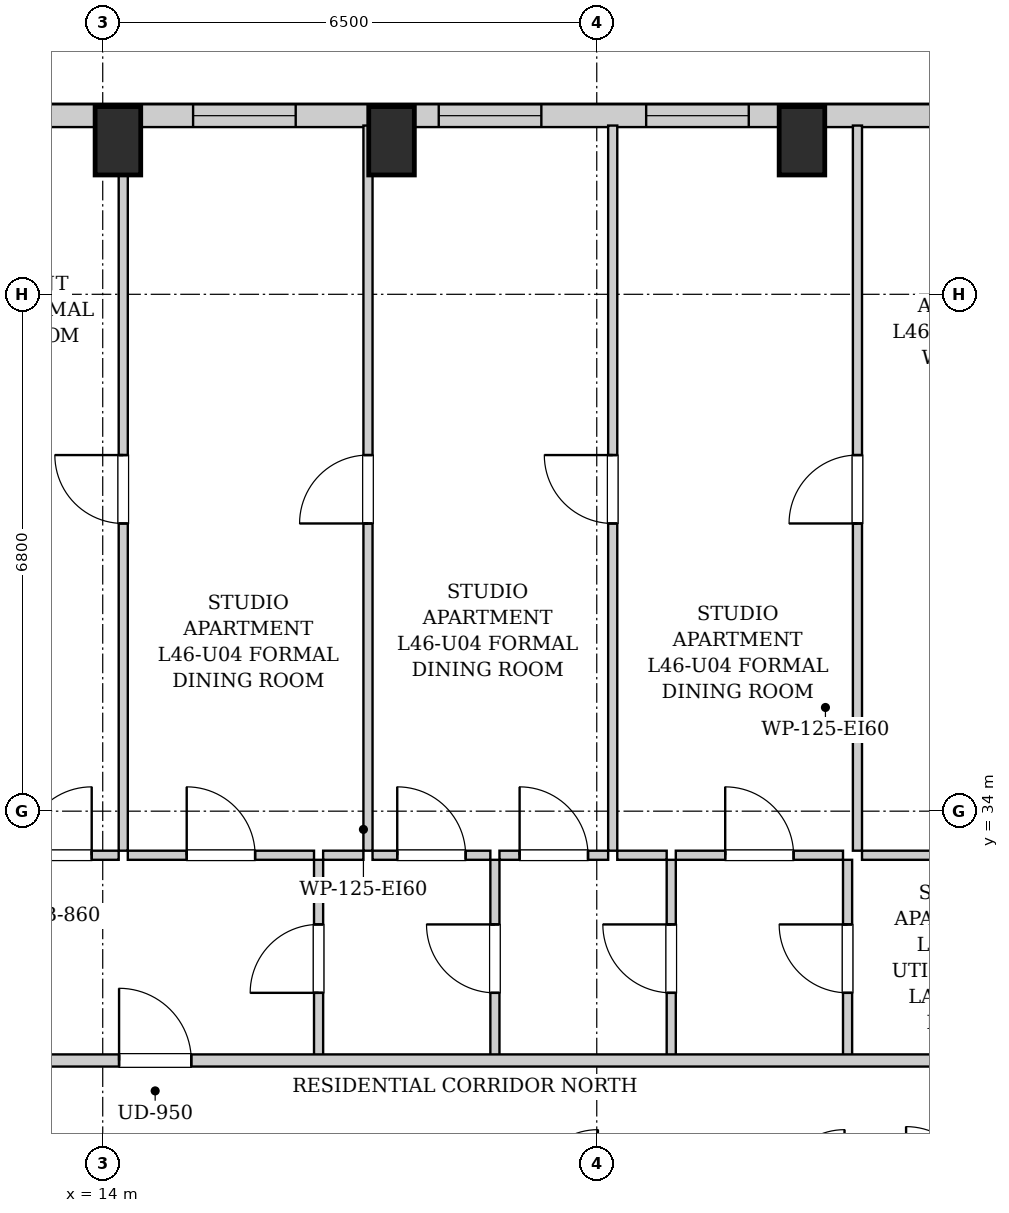
"""IFC4 building model, lengths in metres.
Left out: names, types, materials, properties, quantities, classifications, styles, units other than length and angle.
Written with IfcOpenShell. Run it as: python <this file> out.ifc"""

import sys

from ifc_helpers import new_model, si_unit, direction, frame, frame_2d, origin, origin_2d, place, context, subcontext, project, spatial, rectangle, extrude, element, fill, save


model = new_model("IFC4")
c1 = context("Model", 3, precision=1e-05, world=origin(), true_north=direction((0.0, 1.0)))
c2 = subcontext(c1, "Body", "Model", "MODEL_VIEW")
j1 = project(units=[si_unit("LENGTHUNIT", "METRE"), si_unit("PLANEANGLEUNIT", "RADIAN")], contexts=[c1])
p1 = place(None, origin())
s1 = spatial("IfcSite", under=j1, at=p1, CompositionType="ELEMENT")
p2 = place(p1, origin())
s2 = spatial("IfcBuilding", under=s1, at=p2, CompositionType="ELEMENT")
p3 = place(p2, frame((0.0, 0.0, 160.15)))
s3 = spatial("IfcBuildingStorey", under=s2, at=p3, CompositionType="ELEMENT", Elevation=160.15)
for number, where, z_axis, x_axis in (
    (1, (14.2, 42.82, 0.0), (0.0, 0.0, 1.0), (1.0, 0.0, 0.0)),
    (2, (17.8, 42.82, 0.0), (0.0, 0.0, 1.0), (1.0, 0.0, 0.0)),
    (3, (23.2, 42.82, 0.0), (0.0, 0.0, 1.0), (1.0, 0.0, 0.0)),
):
    element("IfcColumn", number, at=place(p3, frame(where, z_axis=z_axis, x_axis=x_axis)), inside=s3, PredefinedType="COLUMN", context=c2, shape_type="SweptSolid", body=[
        extrude(rectangle(XDim=0.6, YDim=0.9, at=origin_2d()), origin(), (0.0, 0.0, 1.0), 3.25),
    ])
p4 = place(p3, frame((10.0, 43.15, 0.0), z_axis=(0.0, 0.0, 1.0), x_axis=(1.0, 0.0, 0.0)))
e4 = element("IfcWall", 4, at=p4, inside=s3, PredefinedType="SOLIDWALL", context=c2, shape_type="SweptSolid", body=[
    extrude(rectangle(XDim=21.35, YDim=0.3, at=frame_2d((10.675, 0.0))), origin(), (0.0, 0.0, 1.0), 2.99),
])
p5 = place(p4, frame((1.956, 0.0, 0.55)))
e5 = element("IfcOpeningElement", 5, at=p5, cuts=e4, PredefinedType="OPENING", context=c2, shape_type="SweptSolid", body=[
    extrude(rectangle(XDim=1.35, YDim=1.2, at=frame_2d((0.675, 0.6))), frame((0.0, 0.16, 0.0), z_axis=(0.0, -1.0, 0.0), x_axis=(1.0, 0.0, 0.0)), (0.0, 0.0, 1.0), 0.32),
])
p6 = place(p4, frame((5.189, 0.0, 0.55)))
e6 = element("IfcOpeningElement", 6, at=p6, cuts=e4, PredefinedType="OPENING", context=c2, shape_type="SweptSolid", body=[
    extrude(rectangle(XDim=1.35, YDim=1.2, at=frame_2d((0.675, 0.6))), frame((0.0, 0.16, 0.0), z_axis=(0.0, -1.0, 0.0), x_axis=(1.0, 0.0, 0.0)), (0.0, 0.0, 1.0), 0.32),
])
p7 = place(p4, frame((8.421, 0.0, 0.55)))
e7 = element("IfcOpeningElement", 7, at=p7, cuts=e4, PredefinedType="OPENING", context=c2, shape_type="SweptSolid", body=[
    extrude(rectangle(XDim=1.35, YDim=1.2, at=frame_2d((0.675, 0.6))), frame((0.0, 0.16, 0.0), z_axis=(0.0, -1.0, 0.0), x_axis=(1.0, 0.0, 0.0)), (0.0, 0.0, 1.0), 0.32),
])
p8 = place(p4, frame((11.15, 0.0, 0.55)))
e8 = element("IfcOpeningElement", 8, at=p8, cuts=e4, PredefinedType="OPENING", context=c2, shape_type="SweptSolid", body=[
    extrude(rectangle(XDim=1.35, YDim=1.2, at=frame_2d((0.675, 0.6))), frame((0.0, 0.16, 0.0), z_axis=(0.0, -1.0, 0.0), x_axis=(1.0, 0.0, 0.0)), (0.0, 0.0, 1.0), 0.32),
])
p9 = place(p4, frame((18.044, 0.0, 0.55)))
e9 = element("IfcOpeningElement", 9, at=p9, cuts=e4, PredefinedType="OPENING", context=c2, shape_type="SweptSolid", body=[
    extrude(rectangle(XDim=1.35, YDim=1.2, at=frame_2d((0.675, 0.6))), frame((0.0, 0.16, 0.0), z_axis=(0.0, -1.0, 0.0), x_axis=(1.0, 0.0, 0.0)), (0.0, 0.0, 1.0), 0.32),
])
p10 = place(p3, frame((16.84, 30.76, 0.0), z_axis=(0.0, 0.0, 1.0), x_axis=(0.0, 1.0, 0.0)))
e10 = element("IfcWall", 10, at=p10, inside=s3, PredefinedType="PARTITIONING", context=c2, shape_type="SweptSolid", body=[
    extrude(rectangle(XDim=2.6, YDim=0.12, at=frame_2d((1.3, 0.0))), origin(), (0.0, 0.0, 1.0), 2.99),
])
p11 = place(p10, frame((0.85, 0.0, 0.0)))
e11 = element("IfcOpeningElement", 11, at=p11, cuts=e10, PredefinedType="OPENING", context=c2, shape_type="SweptSolid", body=[
    extrude(rectangle(XDim=0.9, YDim=2.05, at=frame_2d((0.45, 1.025))), frame((0.0, 0.07, 0.0), z_axis=(0.0, -1.0, 0.0), x_axis=(1.0, 0.0, 0.0)), (0.0, 0.0, 1.0), 0.14),
])
p12 = place(p3, frame((12.6, 33.42, 0.0), z_axis=(0.0, 0.0, 1.0), x_axis=(1.0, 0.0, 0.0)))
e12 = element("IfcWall", 12, at=p12, inside=s3, PredefinedType="PARTITIONING", context=c2, shape_type="SweptSolid", body=[
    extrude(rectangle(XDim=1.61, YDim=0.12, at=frame_2d((0.805, 0.0))), origin(), (0.0, 0.0, 1.0), 2.99),
])
p13 = place(p12, frame((0.355, 0.0, 0.0)))
e13 = element("IfcOpeningElement", 13, at=p13, cuts=e12, PredefinedType="OPENING", context=c2, shape_type="SweptSolid", body=[
    extrude(rectangle(XDim=0.9, YDim=2.05, at=frame_2d((0.45, 1.025))), frame((0.0, 0.07, 0.0), z_axis=(0.0, -1.0, 0.0), x_axis=(1.0, 0.0, 0.0)), (0.0, 0.0, 1.0), 0.14),
])
p14 = place(p3, frame((14.33, 33.42, 0.0), z_axis=(0.0, 0.0, 1.0), x_axis=(1.0, 0.0, 0.0)))
e14 = element("IfcWall", 14, at=p14, inside=s3, PredefinedType="PARTITIONING", context=c2, shape_type="SweptSolid", body=[
    extrude(rectangle(XDim=2.45, YDim=0.12, at=frame_2d((1.225, 0.0))), origin(), (0.0, 0.0, 1.0), 2.99),
])
p15 = place(p14, frame((0.775, 0.0, 0.0)))
e15 = element("IfcOpeningElement", 15, at=p15, cuts=e14, PredefinedType="OPENING", context=c2, shape_type="SweptSolid", body=[
    extrude(rectangle(XDim=0.9, YDim=2.05, at=frame_2d((0.45, 1.025))), frame((0.0, 0.07, 0.0), z_axis=(0.0, -1.0, 0.0), x_axis=(1.0, 0.0, 0.0)), (0.0, 0.0, 1.0), 0.14),
])
p16 = place(p3, frame((19.16, 30.76, 0.0), z_axis=(0.0, 0.0, 1.0), x_axis=(0.0, 1.0, 0.0)))
e16 = element("IfcWall", 16, at=p16, inside=s3, PredefinedType="PARTITIONING", context=c2, shape_type="SweptSolid", body=[
    extrude(rectangle(XDim=2.6, YDim=0.12, at=frame_2d((1.3, 0.0))), origin(), (0.0, 0.0, 1.0), 2.99),
])
p17 = place(p16, frame((0.85, 0.0, 0.0)))
e17 = element("IfcOpeningElement", 17, at=p17, cuts=e16, PredefinedType="OPENING", context=c2, shape_type="SweptSolid", body=[
    extrude(rectangle(XDim=0.9, YDim=2.05, at=frame_2d((0.45, 1.025))), frame((0.0, 0.07, 0.0), z_axis=(0.0, -1.0, 0.0), x_axis=(1.0, 0.0, 0.0)), (0.0, 0.0, 1.0), 0.14),
])
p18 = place(p3, frame((16.9, 33.42, 0.0), z_axis=(0.0, 0.0, 1.0), x_axis=(1.0, 0.0, 0.0)))
e18 = element("IfcWall", 18, at=p18, inside=s3, PredefinedType="PARTITIONING", context=c2, shape_type="SweptSolid", body=[
    extrude(rectangle(XDim=0.53, YDim=0.12, at=frame_2d((0.265, 0.0))), origin(), (0.0, 0.0, 1.0), 2.99),
])
p19 = place(p3, frame((17.55, 33.42, 0.0), z_axis=(0.0, 0.0, 1.0), x_axis=(1.0, 0.0, 0.0)))
e19 = element("IfcWall", 19, at=p19, inside=s3, PredefinedType="PARTITIONING", context=c2, shape_type="SweptSolid", body=[
    extrude(rectangle(XDim=1.55, YDim=0.12, at=frame_2d((0.775, 0.0))), origin(), (0.0, 0.0, 1.0), 2.99),
])
p20 = place(p19, frame((0.325, 0.0, 0.0)))
e20 = element("IfcOpeningElement", 20, at=p20, cuts=e19, PredefinedType="OPENING", context=c2, shape_type="SweptSolid", body=[
    extrude(rectangle(XDim=0.9, YDim=2.05, at=frame_2d((0.45, 1.025))), frame((0.0, 0.07, 0.0), z_axis=(0.0, -1.0, 0.0), x_axis=(1.0, 0.0, 0.0)), (0.0, 0.0, 1.0), 0.14),
])
p21 = place(p3, frame((21.48, 30.76, 0.0), z_axis=(0.0, 0.0, 1.0), x_axis=(0.0, 1.0, 0.0)))
e21 = element("IfcWall", 21, at=p21, inside=s3, PredefinedType="PARTITIONING", context=c2, shape_type="SweptSolid", body=[
    extrude(rectangle(XDim=2.6, YDim=0.12, at=frame_2d((1.3, 0.0))), origin(), (0.0, 0.0, 1.0), 2.99),
])
p22 = place(p21, frame((0.85, 0.0, 0.0)))
e22 = element("IfcOpeningElement", 22, at=p22, cuts=e21, PredefinedType="OPENING", context=c2, shape_type="SweptSolid", body=[
    extrude(rectangle(XDim=0.9, YDim=2.05, at=frame_2d((0.45, 1.025))), frame((0.0, 0.07, 0.0), z_axis=(0.0, -1.0, 0.0), x_axis=(1.0, 0.0, 0.0)), (0.0, 0.0, 1.0), 0.14),
])
p23 = place(p3, frame((19.22, 33.42, 0.0), z_axis=(0.0, 0.0, 1.0), x_axis=(1.0, 0.0, 0.0)))
e23 = element("IfcWall", 23, at=p23, inside=s3, PredefinedType="PARTITIONING", context=c2, shape_type="SweptSolid", body=[
    extrude(rectangle(XDim=1.43, YDim=0.12, at=frame_2d((0.715, 0.0))), origin(), (0.0, 0.0, 1.0), 2.99),
])
p24 = place(p23, frame((0.265, 0.0, 0.0)))
e24 = element("IfcOpeningElement", 24, at=p24, cuts=e23, PredefinedType="OPENING", context=c2, shape_type="SweptSolid", body=[
    extrude(rectangle(XDim=0.9, YDim=2.05, at=frame_2d((0.45, 1.025))), frame((0.0, 0.07, 0.0), z_axis=(0.0, -1.0, 0.0), x_axis=(1.0, 0.0, 0.0)), (0.0, 0.0, 1.0), 0.14),
])
p25 = place(p3, frame((20.77, 33.42, 0.0), z_axis=(0.0, 0.0, 1.0), x_axis=(1.0, 0.0, 0.0)))
e25 = element("IfcWall", 25, at=p25, inside=s3, PredefinedType="PARTITIONING", context=c2, shape_type="SweptSolid", body=[
    extrude(rectangle(XDim=0.65, YDim=0.12, at=frame_2d((0.325, 0.0))), origin(), (0.0, 0.0, 1.0), 2.99),
])
p26 = place(p3, frame((23.8, 30.76, 0.0), z_axis=(0.0, 0.0, 1.0), x_axis=(0.0, 1.0, 0.0)))
e26 = element("IfcWall", 26, at=p26, inside=s3, PredefinedType="PARTITIONING", context=c2, shape_type="SweptSolid", body=[
    extrude(rectangle(XDim=2.6, YDim=0.12, at=frame_2d((1.3, 0.0))), origin(), (0.0, 0.0, 1.0), 2.99),
])
p27 = place(p26, frame((0.85, 0.0, 0.0)))
e27 = element("IfcOpeningElement", 27, at=p27, cuts=e26, PredefinedType="OPENING", context=c2, shape_type="SweptSolid", body=[
    extrude(rectangle(XDim=0.9, YDim=2.05, at=frame_2d((0.45, 1.025))), frame((0.0, 0.07, 0.0), z_axis=(0.0, -1.0, 0.0), x_axis=(1.0, 0.0, 0.0)), (0.0, 0.0, 1.0), 0.14),
])
p28 = place(p3, frame((21.54, 33.42, 0.0), z_axis=(0.0, 0.0, 1.0), x_axis=(1.0, 0.0, 0.0)))
e28 = element("IfcWall", 28, at=p28, inside=s3, PredefinedType="PARTITIONING", context=c2, shape_type="SweptSolid", body=[
    extrude(rectangle(XDim=2.2, YDim=0.12, at=frame_2d((1.1, 0.0))), origin(), (0.0, 0.0, 1.0), 2.99),
])
p29 = place(p28, frame((0.65, 0.0, 0.0)))
e29 = element("IfcOpeningElement", 29, at=p29, cuts=e28, PredefinedType="OPENING", context=c2, shape_type="SweptSolid", body=[
    extrude(rectangle(XDim=0.9, YDim=2.05, at=frame_2d((0.45, 1.025))), frame((0.0, 0.07, 0.0), z_axis=(0.0, -1.0, 0.0), x_axis=(1.0, 0.0, 0.0)), (0.0, 0.0, 1.0), 0.14),
])
p30 = place(p3, frame((23.99, 33.42, 0.0), z_axis=(0.0, 0.0, 1.0), x_axis=(1.0, 0.0, 0.0)))
e30 = element("IfcWall", 30, at=p30, inside=s3, PredefinedType="PARTITIONING", context=c2, shape_type="SweptSolid", body=[
    extrude(rectangle(XDim=3.1, YDim=0.12, at=frame_2d((1.55, 0.0))), origin(), (0.0, 0.0, 1.0), 2.99),
])
p31 = place(p30, frame((1.1, 0.0, 0.0)))
e31 = element("IfcOpeningElement", 31, at=p31, cuts=e30, PredefinedType="OPENING", context=c2, shape_type="SweptSolid", body=[
    extrude(rectangle(XDim=0.9, YDim=2.05, at=frame_2d((0.45, 1.025))), frame((0.0, 0.07, 0.0), z_axis=(0.0, -1.0, 0.0), x_axis=(1.0, 0.0, 0.0)), (0.0, 0.0, 1.0), 0.14),
])
p32 = place(p3, frame((14.27, 33.48, 0.0), z_axis=(0.0, 0.0, 1.0), x_axis=(0.0, 1.0, 0.0)))
e32 = element("IfcWall", 32, at=p32, inside=s3, PredefinedType="PARTITIONING", context=c2, shape_type="SweptSolid", body=[
    extrude(rectangle(XDim=9.54, YDim=0.12, at=frame_2d((4.77, 0.0))), origin(), (0.0, 0.0, 1.0), 2.99),
])
p33 = place(p32, frame((4.305, 0.0, 0.0)))
e33 = element("IfcOpeningElement", 33, at=p33, cuts=e32, PredefinedType="OPENING", context=c2, shape_type="SweptSolid", body=[
    extrude(rectangle(XDim=0.9, YDim=2.05, at=frame_2d((0.45, 1.025))), frame((0.0, 0.07, 0.0), z_axis=(0.0, -1.0, 0.0), x_axis=(1.0, 0.0, 0.0)), (0.0, 0.0, 1.0), 0.14),
])
p34 = place(p3, frame((17.49, 33.48, 0.0), z_axis=(0.0, 0.0, 1.0), x_axis=(0.0, 1.0, 0.0)))
e34 = element("IfcWall", 34, at=p34, inside=s3, PredefinedType="PARTITIONING", context=c2, shape_type="SweptSolid", body=[
    extrude(rectangle(XDim=9.54, YDim=0.12, at=frame_2d((4.77, 0.0))), origin(), (0.0, 0.0, 1.0), 2.99),
])
p35 = place(p34, frame((4.305, 0.0, 0.0)))
e35 = element("IfcOpeningElement", 35, at=p35, cuts=e34, PredefinedType="OPENING", context=c2, shape_type="SweptSolid", body=[
    extrude(rectangle(XDim=0.9, YDim=2.05, at=frame_2d((0.45, 1.025))), frame((0.0, 0.07, 0.0), z_axis=(0.0, -1.0, 0.0), x_axis=(1.0, 0.0, 0.0)), (0.0, 0.0, 1.0), 0.14),
])
p36 = place(p3, frame((20.71, 33.48, 0.0), z_axis=(0.0, 0.0, 1.0), x_axis=(0.0, 1.0, 0.0)))
e36 = element("IfcWall", 36, at=p36, inside=s3, PredefinedType="PARTITIONING", context=c2, shape_type="SweptSolid", body=[
    extrude(rectangle(XDim=9.54, YDim=0.12, at=frame_2d((4.77, 0.0))), origin(), (0.0, 0.0, 1.0), 2.99),
])
p37 = place(p36, frame((4.305, 0.0, 0.0)))
e37 = element("IfcOpeningElement", 37, at=p37, cuts=e36, PredefinedType="OPENING", context=c2, shape_type="SweptSolid", body=[
    extrude(rectangle(XDim=0.9, YDim=2.05, at=frame_2d((0.45, 1.025))), frame((0.0, 0.07, 0.0), z_axis=(0.0, -1.0, 0.0), x_axis=(1.0, 0.0, 0.0)), (0.0, 0.0, 1.0), 0.14),
])
p38 = place(p3, frame((23.93, 33.48, 0.0), z_axis=(0.0, 0.0, 1.0), x_axis=(0.0, 1.0, 0.0)))
e38 = element("IfcWall", 38, at=p38, inside=s3, PredefinedType="PARTITIONING", context=c2, shape_type="SweptSolid", body=[
    extrude(rectangle(XDim=9.54, YDim=0.12, at=frame_2d((4.77, 0.0))), origin(), (0.0, 0.0, 1.0), 2.99),
])
p39 = place(p38, frame((4.305, 0.0, 0.0)))
e39 = element("IfcOpeningElement", 39, at=p39, cuts=e38, PredefinedType="OPENING", context=c2, shape_type="SweptSolid", body=[
    extrude(rectangle(XDim=0.9, YDim=2.05, at=frame_2d((0.45, 1.025))), frame((0.0, 0.07, 0.0), z_axis=(0.0, -1.0, 0.0), x_axis=(1.0, 0.0, 0.0)), (0.0, 0.0, 1.0), 0.14),
])
p40 = place(p3, frame((10.05, 30.72, 0.0), z_axis=(0.0, 0.0, 1.0), x_axis=(1.0, 0.0, 0.0)))
e40 = element("IfcWall", 40, at=p40, inside=s3, PredefinedType="PARTITIONING", context=c2, shape_type="SweptSolid", body=[
    extrude(rectangle(XDim=27.7, YDim=0.16, at=frame_2d((13.85, 0.0))), origin(), (0.0, 0.0, 1.0), 2.99),
])
p41 = place(p40, frame((4.165, 0.0, 0.0)))
e41 = element("IfcOpeningElement", 41, at=p41, cuts=e40, PredefinedType="OPENING", context=c2, shape_type="SweptSolid", body=[
    extrude(rectangle(XDim=0.95, YDim=2.1, at=frame_2d((0.475, 1.05))), frame((0.0, 0.09, 0.0), z_axis=(0.0, -1.0, 0.0), x_axis=(1.0, 0.0, 0.0)), (0.0, 0.0, 1.0), 0.18),
])
p42 = place(p11, origin())
e42 = element("IfcDoor", 42, at=p42, inside=s3, OperationType="SINGLE_SWING_LEFT", PredefinedType="DOOR", context=c2, shape_type="SweptSolid", body=[
    extrude(rectangle(XDim=0.9, YDim=2.05, at=frame_2d((0.45, 1.025))), frame((0.0, 0.025, 0.0), z_axis=(0.0, -1.0, 0.0), x_axis=(1.0, 0.0, 0.0)), (0.0, 0.0, 1.0), 0.05),
])
fill(e11, e42)
p43 = place(p13, origin())
e43 = element("IfcDoor", 43, at=p43, inside=s3, OperationType="SINGLE_SWING_RIGHT", PredefinedType="DOOR", context=c2, shape_type="SweptSolid", body=[
    extrude(rectangle(XDim=0.9, YDim=2.05, at=frame_2d((0.45, 1.025))), frame((0.0, 0.025, 0.0), z_axis=(0.0, -1.0, 0.0), x_axis=(1.0, 0.0, 0.0)), (0.0, 0.0, 1.0), 0.05),
])
fill(e13, e43)
p44 = place(p15, origin())
e44 = element("IfcDoor", 44, at=p44, inside=s3, OperationType="SINGLE_SWING_LEFT", PredefinedType="DOOR", context=c2, shape_type="SweptSolid", body=[
    extrude(rectangle(XDim=0.9, YDim=2.05, at=frame_2d((0.45, 1.025))), frame((0.0, 0.025, 0.0), z_axis=(0.0, -1.0, 0.0), x_axis=(1.0, 0.0, 0.0)), (0.0, 0.0, 1.0), 0.05),
])
fill(e15, e44)
p45 = place(p17, origin())
e45 = element("IfcDoor", 45, at=p45, inside=s3, OperationType="SINGLE_SWING_RIGHT", PredefinedType="DOOR", context=c2, shape_type="SweptSolid", body=[
    extrude(rectangle(XDim=0.9, YDim=2.05, at=frame_2d((0.45, 1.025))), frame((0.0, 0.025, 0.0), z_axis=(0.0, -1.0, 0.0), x_axis=(1.0, 0.0, 0.0)), (0.0, 0.0, 1.0), 0.05),
])
fill(e17, e45)
p46 = place(p20, origin())
e46 = element("IfcDoor", 46, at=p46, inside=s3, OperationType="SINGLE_SWING_LEFT", PredefinedType="DOOR", context=c2, shape_type="SweptSolid", body=[
    extrude(rectangle(XDim=0.9, YDim=2.05, at=frame_2d((0.45, 1.025))), frame((0.0, 0.025, 0.0), z_axis=(0.0, -1.0, 0.0), x_axis=(1.0, 0.0, 0.0)), (0.0, 0.0, 1.0), 0.05),
])
fill(e20, e46)
p47 = place(p22, origin())
e47 = element("IfcDoor", 47, at=p47, inside=s3, OperationType="SINGLE_SWING_RIGHT", PredefinedType="DOOR", context=c2, shape_type="SweptSolid", body=[
    extrude(rectangle(XDim=0.9, YDim=2.05, at=frame_2d((0.45, 1.025))), frame((0.0, 0.025, 0.0), z_axis=(0.0, -1.0, 0.0), x_axis=(1.0, 0.0, 0.0)), (0.0, 0.0, 1.0), 0.05),
])
fill(e22, e47)
p48 = place(p24, origin())
e48 = element("IfcDoor", 48, at=p48, inside=s3, OperationType="SINGLE_SWING_LEFT", PredefinedType="DOOR", context=c2, shape_type="SweptSolid", body=[
    extrude(rectangle(XDim=0.9, YDim=2.05, at=frame_2d((0.45, 1.025))), frame((0.0, 0.025, 0.0), z_axis=(0.0, -1.0, 0.0), x_axis=(1.0, 0.0, 0.0)), (0.0, 0.0, 1.0), 0.05),
])
fill(e24, e48)
p49 = place(p27, origin())
e49 = element("IfcDoor", 49, at=p49, inside=s3, OperationType="SINGLE_SWING_RIGHT", PredefinedType="DOOR", context=c2, shape_type="SweptSolid", body=[
    extrude(rectangle(XDim=0.9, YDim=2.05, at=frame_2d((0.45, 1.025))), frame((0.0, 0.025, 0.0), z_axis=(0.0, -1.0, 0.0), x_axis=(1.0, 0.0, 0.0)), (0.0, 0.0, 1.0), 0.05),
])
fill(e27, e49)
p50 = place(p29, origin())
e50 = element("IfcDoor", 50, at=p50, inside=s3, OperationType="SINGLE_SWING_LEFT", PredefinedType="DOOR", context=c2, shape_type="SweptSolid", body=[
    extrude(rectangle(XDim=0.9, YDim=2.05, at=frame_2d((0.45, 1.025))), frame((0.0, 0.025, 0.0), z_axis=(0.0, -1.0, 0.0), x_axis=(1.0, 0.0, 0.0)), (0.0, 0.0, 1.0), 0.05),
])
fill(e29, e50)
p51 = place(p33, origin())
e51 = element("IfcDoor", 51, at=p51, inside=s3, OperationType="SINGLE_SWING_RIGHT", PredefinedType="DOOR", context=c2, shape_type="SweptSolid", body=[
    extrude(rectangle(XDim=0.9, YDim=2.05, at=frame_2d((0.45, 1.025))), frame((0.0, 0.025, 0.0), z_axis=(0.0, -1.0, 0.0), x_axis=(1.0, 0.0, 0.0)), (0.0, 0.0, 1.0), 0.05),
])
fill(e33, e51)
p52 = place(p35, origin())
e52 = element("IfcDoor", 52, at=p52, inside=s3, OperationType="SINGLE_SWING_LEFT", PredefinedType="DOOR", context=c2, shape_type="SweptSolid", body=[
    extrude(rectangle(XDim=0.9, YDim=2.05, at=frame_2d((0.45, 1.025))), frame((0.0, 0.025, 0.0), z_axis=(0.0, -1.0, 0.0), x_axis=(1.0, 0.0, 0.0)), (0.0, 0.0, 1.0), 0.05),
])
fill(e35, e52)
p53 = place(p37, origin())
e53 = element("IfcDoor", 53, at=p53, inside=s3, OperationType="SINGLE_SWING_RIGHT", PredefinedType="DOOR", context=c2, shape_type="SweptSolid", body=[
    extrude(rectangle(XDim=0.9, YDim=2.05, at=frame_2d((0.45, 1.025))), frame((0.0, 0.025, 0.0), z_axis=(0.0, -1.0, 0.0), x_axis=(1.0, 0.0, 0.0)), (0.0, 0.0, 1.0), 0.05),
])
fill(e37, e53)
p54 = place(p39, origin())
e54 = element("IfcDoor", 54, at=p54, inside=s3, OperationType="SINGLE_SWING_LEFT", PredefinedType="DOOR", context=c2, shape_type="SweptSolid", body=[
    extrude(rectangle(XDim=0.9, YDim=2.05, at=frame_2d((0.45, 1.025))), frame((0.0, 0.025, 0.0), z_axis=(0.0, -1.0, 0.0), x_axis=(1.0, 0.0, 0.0)), (0.0, 0.0, 1.0), 0.05),
])
fill(e39, e54)
p55 = place(p41, origin())
e55 = element("IfcDoor", 55, at=p55, inside=s3, OperationType="SINGLE_SWING_LEFT", PredefinedType="DOOR", context=c2, shape_type="SweptSolid", body=[
    extrude(rectangle(XDim=0.95, YDim=2.1, at=frame_2d((0.475, 1.05))), frame((0.0, 0.025, 0.0), z_axis=(0.0, -1.0, 0.0), x_axis=(1.0, 0.0, 0.0)), (0.0, 0.0, 1.0), 0.05),
])
fill(e41, e55)
p56 = place(p6, origin())
e56 = element("IfcWindow", 56, at=p56, inside=s3, PartitioningType="SINGLE_PANEL", PredefinedType="WINDOW", context=c2, shape_type="SweptSolid", body=[
    extrude(rectangle(XDim=1.35, YDim=1.2, at=frame_2d((0.675, 0.6))), frame((0.0, 0.03, 0.0), z_axis=(0.0, -1.0, 0.0), x_axis=(1.0, 0.0, 0.0)), (0.0, 0.0, 1.0), 0.06),
])
fill(e6, e56)
p57 = place(p7, origin())
e57 = element("IfcWindow", 57, at=p57, inside=s3, PartitioningType="SINGLE_PANEL", PredefinedType="WINDOW", context=c2, shape_type="SweptSolid", body=[
    extrude(rectangle(XDim=1.35, YDim=1.2, at=frame_2d((0.675, 0.6))), frame((0.0, 0.03, 0.0), z_axis=(0.0, -1.0, 0.0), x_axis=(1.0, 0.0, 0.0)), (0.0, 0.0, 1.0), 0.06),
])
fill(e7, e57)
p58 = place(p8, origin())
e58 = element("IfcWindow", 58, at=p58, inside=s3, PartitioningType="SINGLE_PANEL", PredefinedType="WINDOW", context=c2, shape_type="SweptSolid", body=[
    extrude(rectangle(XDim=1.35, YDim=1.2, at=frame_2d((0.675, 0.6))), frame((0.0, 0.03, 0.0), z_axis=(0.0, -1.0, 0.0), x_axis=(1.0, 0.0, 0.0)), (0.0, 0.0, 1.0), 0.06),
])
fill(e8, e58)
save(model, sys.argv[1])
